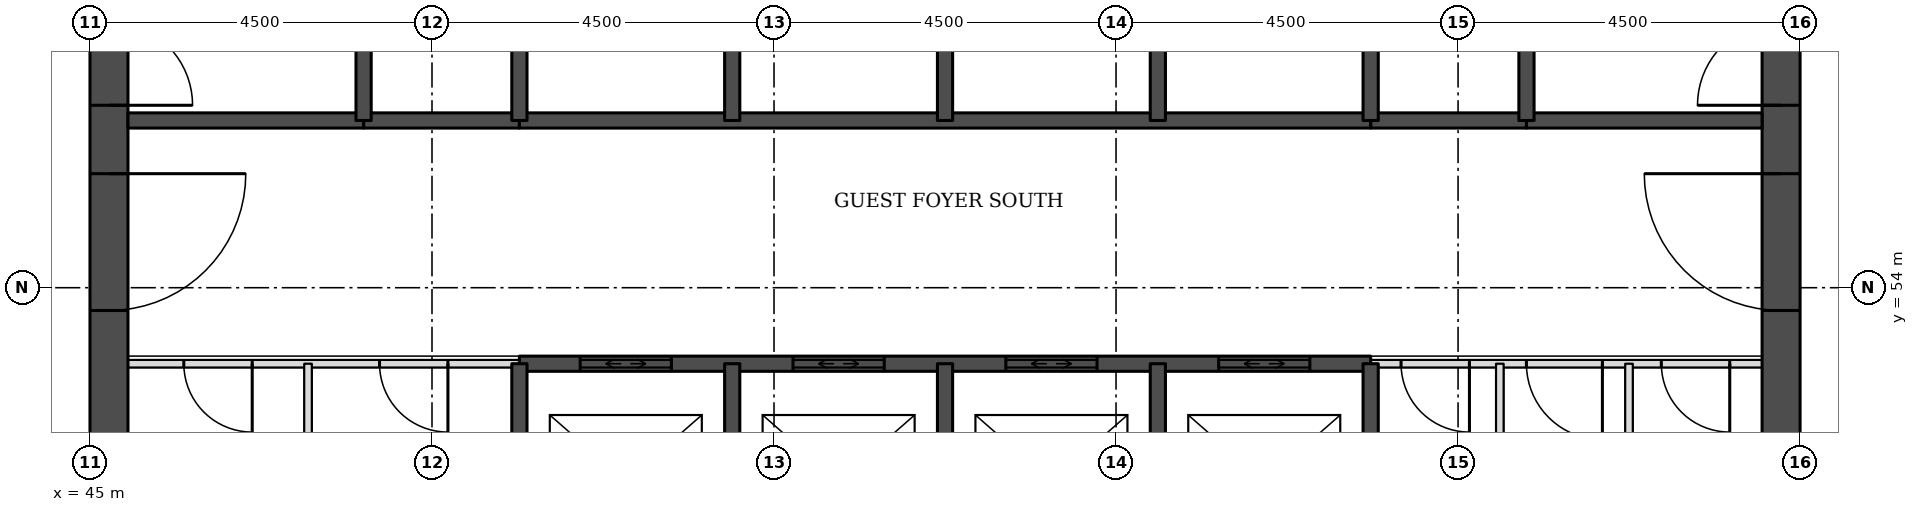
"""IFC4 building model, lengths in metres.
Left out: names, types, materials, properties, quantities, classifications, styles, units other than length and angle.
Written with IfcOpenShell. Run it as: python <this file> out.ifc"""

import sys

from ifc_helpers import new_model, si_unit, direction, frame, frame_2d, origin, place, context, subcontext, project, spatial, rectangle, extrude, element, fill, save


model = new_model("IFC4")
c1 = context("Model", 3, precision=1e-05, world=origin(), true_north=direction((0.0, 1.0)))
c2 = subcontext(c1, "Body", "Model", "MODEL_VIEW")
j1 = project(units=[si_unit("LENGTHUNIT", "METRE"), si_unit("PLANEANGLEUNIT", "RADIAN")], contexts=[c1])
p1 = place(None, origin())
s1 = spatial("IfcSite", under=j1, at=p1, CompositionType="ELEMENT")
p2 = place(p1, origin())
s2 = spatial("IfcBuilding", under=s1, at=p2, CompositionType="ELEMENT")
p3 = place(p2, frame((0.0, 0.0, 23.1)))
s3 = spatial("IfcBuildingStorey", under=s2, at=p3, CompositionType="ELEMENT", Elevation=23.1)
p4 = place(p3, frame((45.25, 49.5, 0.0), z_axis=(0.0, 0.0, 1.0), x_axis=(0.0, 1.0, 0.0)))
e1 = element("IfcWall", 1, at=p4, inside=s3, PredefinedType="SHEAR", context=c2, shape_type="SweptSolid", body=[
    extrude(rectangle(XDim=22.5, YDim=0.5, at=frame_2d((11.25, 0.0))), origin(), (0.0, 0.0, 1.0), 3.3),
])
p5 = place(p4, frame((4.2, 0.0, 0.0)))
e2 = element("IfcOpeningElement", 2, at=p5, cuts=e1, PredefinedType="OPENING", context=c2, shape_type="SweptSolid", body=[
    extrude(rectangle(XDim=1.8, YDim=2.1, at=frame_2d((0.9, 1.05))), frame((0.0, 0.26, 0.0), z_axis=(0.0, -1.0, 0.0), x_axis=(1.0, 0.0, 0.0)), (0.0, 0.0, 1.0), 0.52),
])
p6 = place(p4, frame((6.9, 0.0, 0.0)))
e3 = element("IfcOpeningElement", 3, at=p6, cuts=e1, PredefinedType="OPENING", context=c2, shape_type="SweptSolid", body=[
    extrude(rectangle(XDim=1.1, YDim=2.1, at=frame_2d((0.55, 1.05))), frame((0.0, 0.26, 0.0), z_axis=(0.0, -1.0, 0.0), x_axis=(1.0, 0.0, 0.0)), (0.0, 0.0, 1.0), 0.52),
])
p7 = place(p4, frame((13.6, 0.0, 0.0)))
e4 = element("IfcOpeningElement", 4, at=p7, cuts=e1, PredefinedType="OPENING", context=c2, shape_type="SweptSolid", body=[
    extrude(rectangle(XDim=1.1, YDim=2.1, at=frame_2d((0.55, 1.05))), frame((0.0, 0.26, 0.0), z_axis=(0.0, -1.0, 0.0), x_axis=(1.0, 0.0, 0.0)), (0.0, 0.0, 1.0), 0.52),
])
p8 = place(p4, frame((16.5, 0.0, 0.0)))
e5 = element("IfcOpeningElement", 5, at=p8, cuts=e1, PredefinedType="OPENING", context=c2, shape_type="SweptSolid", body=[
    extrude(rectangle(XDim=1.8, YDim=2.1, at=frame_2d((0.9, 1.05))), frame((0.0, 0.26, 0.0), z_axis=(0.0, -1.0, 0.0), x_axis=(1.0, 0.0, 0.0)), (0.0, 0.0, 1.0), 0.52),
])
p9 = place(p3, frame((67.25, 49.5, 0.0), z_axis=(0.0, 0.0, 1.0), x_axis=(0.0, 1.0, 0.0)))
e6 = element("IfcWall", 6, at=p9, inside=s3, PredefinedType="SHEAR", context=c2, shape_type="SweptSolid", body=[
    extrude(rectangle(XDim=22.5, YDim=0.5, at=frame_2d((11.25, 0.0))), origin(), (0.0, 0.0, 1.0), 3.3),
])
p10 = place(p9, frame((4.2, 0.0, 0.0)))
e7 = element("IfcOpeningElement", 7, at=p10, cuts=e6, PredefinedType="OPENING", context=c2, shape_type="SweptSolid", body=[
    extrude(rectangle(XDim=1.8, YDim=2.1, at=frame_2d((0.9, 1.05))), frame((0.0, 0.26, 0.0), z_axis=(0.0, -1.0, 0.0), x_axis=(1.0, 0.0, 0.0)), (0.0, 0.0, 1.0), 0.52),
])
p11 = place(p9, frame((6.9, 0.0, 0.0)))
e8 = element("IfcOpeningElement", 8, at=p11, cuts=e6, PredefinedType="OPENING", context=c2, shape_type="SweptSolid", body=[
    extrude(rectangle(XDim=1.1, YDim=2.1, at=frame_2d((0.55, 1.05))), frame((0.0, 0.26, 0.0), z_axis=(0.0, -1.0, 0.0), x_axis=(1.0, 0.0, 0.0)), (0.0, 0.0, 1.0), 0.52),
])
p12 = place(p9, frame((13.6, 0.0, 0.0)))
e9 = element("IfcOpeningElement", 9, at=p12, cuts=e6, PredefinedType="OPENING", context=c2, shape_type="SweptSolid", body=[
    extrude(rectangle(XDim=1.1, YDim=2.1, at=frame_2d((0.55, 1.05))), frame((0.0, 0.26, 0.0), z_axis=(0.0, -1.0, 0.0), x_axis=(1.0, 0.0, 0.0)), (0.0, 0.0, 1.0), 0.52),
])
p13 = place(p9, frame((16.5, 0.0, 0.0)))
e10 = element("IfcOpeningElement", 10, at=p13, cuts=e6, PredefinedType="OPENING", context=c2, shape_type="SweptSolid", body=[
    extrude(rectangle(XDim=1.8, YDim=2.1, at=frame_2d((0.9, 1.05))), frame((0.0, 0.26, 0.0), z_axis=(0.0, -1.0, 0.0), x_axis=(1.0, 0.0, 0.0)), (0.0, 0.0, 1.0), 0.52),
])
p14 = place(p3, frame((45.5, 53.0, 0.0), z_axis=(0.0, 0.0, 1.0), x_axis=(1.0, 0.0, 0.0)))
e11 = element("IfcWall", 11, at=p14, inside=s3, PredefinedType="PARTITIONING", context=c2, shape_type="SweptSolid", body=[
    extrude(rectangle(XDim=5.15, YDim=0.1, at=frame_2d((2.575, 0.0))), origin(), (0.0, 0.0, 1.0), 3.08),
])
p15 = place(p14, frame((0.735, 0.0, 0.0)))
e12 = element("IfcOpeningElement", 12, at=p15, cuts=e11, PredefinedType="OPENING", context=c2, shape_type="SweptSolid", body=[
    extrude(rectangle(XDim=0.9, YDim=2.1, at=frame_2d((0.45, 1.05))), frame((0.0, 0.06, 0.0), z_axis=(0.0, -1.0, 0.0), x_axis=(1.0, 0.0, 0.0)), (0.0, 0.0, 1.0), 0.12),
])
p16 = place(p14, frame((3.31, 0.0, 0.0)))
e13 = element("IfcOpeningElement", 13, at=p16, cuts=e11, PredefinedType="OPENING", context=c2, shape_type="SweptSolid", body=[
    extrude(rectangle(XDim=0.9, YDim=2.1, at=frame_2d((0.45, 1.05))), frame((0.0, 0.06, 0.0), z_axis=(0.0, -1.0, 0.0), x_axis=(1.0, 0.0, 0.0)), (0.0, 0.0, 1.0), 0.12),
])
p17 = place(p3, frame((61.85, 53.0, 0.0), z_axis=(0.0, 0.0, 1.0), x_axis=(1.0, 0.0, 0.0)))
e14 = element("IfcWall", 14, at=p17, inside=s3, PredefinedType="PARTITIONING", context=c2, shape_type="SweptSolid", body=[
    extrude(rectangle(XDim=5.15, YDim=0.1, at=frame_2d((2.575, 0.0))), origin(), (0.0, 0.0, 1.0), 3.08),
])
p18 = place(p17, frame((3.824, 0.0, 0.0)))
e15 = element("IfcOpeningElement", 15, at=p18, cuts=e14, PredefinedType="OPENING", context=c2, shape_type="SweptSolid", body=[
    extrude(rectangle(XDim=0.9, YDim=2.1, at=frame_2d((0.45, 1.05))), frame((0.0, 0.06, 0.0), z_axis=(0.0, -1.0, 0.0), x_axis=(1.0, 0.0, 0.0)), (0.0, 0.0, 1.0), 0.12),
])
p19 = place(p17, frame((2.049, 0.0, 0.0)))
e16 = element("IfcOpeningElement", 16, at=p19, cuts=e14, PredefinedType="OPENING", context=c2, shape_type="SweptSolid", body=[
    extrude(rectangle(XDim=1.0, YDim=2.1, at=frame_2d((0.5, 1.05))), frame((0.0, 0.06, 0.0), z_axis=(0.0, -1.0, 0.0), x_axis=(1.0, 0.0, 0.0)), (0.0, 0.0, 1.0), 0.12),
])
p20 = place(p17, frame((0.4, 0.0, 0.0)))
e17 = element("IfcOpeningElement", 17, at=p20, cuts=e14, PredefinedType="OPENING", context=c2, shape_type="SweptSolid", body=[
    extrude(rectangle(XDim=0.9, YDim=2.1, at=frame_2d((0.45, 1.05))), frame((0.0, 0.06, 0.0), z_axis=(0.0, -1.0, 0.0), x_axis=(1.0, 0.0, 0.0)), (0.0, 0.0, 1.0), 0.12),
])
p21 = place(p3, frame((50.65, 53.0, 0.0), z_axis=(0.0, 0.0, 1.0), x_axis=(1.0, 0.0, 0.0)))
e18 = element("IfcWall", 18, at=p21, inside=s3, PredefinedType="SOLIDWALL", context=c2, shape_type="SweptSolid", body=[
    extrude(rectangle(XDim=11.2, YDim=0.2, at=frame_2d((5.6, 0.0))), origin(), (0.0, 0.0, 1.0), 3.08),
])
p22 = place(p21, frame((0.8, 0.0, 0.0)))
e19 = element("IfcOpeningElement", 19, at=p22, cuts=e18, PredefinedType="OPENING", context=c2, shape_type="SweptSolid", body=[
    extrude(rectangle(XDim=1.2, YDim=2.1, at=frame_2d((0.6, 1.05))), frame((0.0, 0.11, 0.0), z_axis=(0.0, -1.0, 0.0), x_axis=(1.0, 0.0, 0.0)), (0.0, 0.0, 1.0), 0.22),
])
p23 = place(p21, frame((3.6, 0.0, 0.0)))
e20 = element("IfcOpeningElement", 20, at=p23, cuts=e18, PredefinedType="OPENING", context=c2, shape_type="SweptSolid", body=[
    extrude(rectangle(XDim=1.2, YDim=2.1, at=frame_2d((0.6, 1.05))), frame((0.0, 0.11, 0.0), z_axis=(0.0, -1.0, 0.0), x_axis=(1.0, 0.0, 0.0)), (0.0, 0.0, 1.0), 0.22),
])
p24 = place(p21, frame((6.4, 0.0, 0.0)))
e21 = element("IfcOpeningElement", 21, at=p24, cuts=e18, PredefinedType="OPENING", context=c2, shape_type="SweptSolid", body=[
    extrude(rectangle(XDim=1.2, YDim=2.1, at=frame_2d((0.6, 1.05))), frame((0.0, 0.11, 0.0), z_axis=(0.0, -1.0, 0.0), x_axis=(1.0, 0.0, 0.0)), (0.0, 0.0, 1.0), 0.22),
])
p25 = place(p21, frame((9.2, 0.0, 0.0)))
e22 = element("IfcOpeningElement", 22, at=p25, cuts=e18, PredefinedType="OPENING", context=c2, shape_type="SweptSolid", body=[
    extrude(rectangle(XDim=1.2, YDim=2.1, at=frame_2d((0.6, 1.05))), frame((0.0, 0.11, 0.0), z_axis=(0.0, -1.0, 0.0), x_axis=(1.0, 0.0, 0.0)), (0.0, 0.0, 1.0), 0.22),
])
for number, where, z_axis, x_axis in (
    (23, (48.6, 56.2, 0.0), (0.0, 0.0, 1.0), (1.0, 0.0, 0.0)),
    (24, (61.85, 56.2, 0.0), (0.0, 0.0, 1.0), (1.0, 0.0, 0.0)),
):
    element("IfcWall", number, at=place(p3, frame(where, z_axis=z_axis, x_axis=x_axis)), inside=s3, PredefinedType="SOLIDWALL", context=c2, shape_type="SweptSolid", body=[
        extrude(rectangle(XDim=2.05, YDim=0.2, at=frame_2d((1.025, 0.0))), origin(), (0.0, 0.0, 1.0), 3.08),
    ])
p26 = place(p3, frame((45.5, 56.2, 0.0), z_axis=(0.0, 0.0, 1.0), x_axis=(1.0, 0.0, 0.0)))
e25 = element("IfcWall", 25, at=p26, inside=s3, PredefinedType="SOLIDWALL", context=c2, shape_type="SweptSolid", body=[
    extrude(rectangle(XDim=3.1, YDim=0.2, at=frame_2d((1.55, 0.0))), origin(), (0.0, 0.0, 1.0), 3.08),
])
p27 = place(p3, frame((50.65, 56.2, 0.0), z_axis=(0.0, 0.0, 1.0), x_axis=(1.0, 0.0, 0.0)))
e26 = element("IfcWall", 26, at=p27, inside=s3, PredefinedType="SOLIDWALL", context=c2, shape_type="SweptSolid", body=[
    extrude(rectangle(XDim=11.2, YDim=0.2, at=frame_2d((5.6, 0.0))), origin(), (0.0, 0.0, 1.0), 3.08),
])
p28 = place(p3, frame((63.9, 56.2, 0.0), z_axis=(0.0, 0.0, 1.0), x_axis=(1.0, 0.0, 0.0)))
e27 = element("IfcWall", 27, at=p28, inside=s3, PredefinedType="SOLIDWALL", context=c2, shape_type="SweptSolid", body=[
    extrude(rectangle(XDim=3.1, YDim=0.2, at=frame_2d((1.55, 0.0))), origin(), (0.0, 0.0, 1.0), 3.08),
])
p29 = place(p3, frame((47.869, 50.0, 0.0), z_axis=(0.0, 0.0, 1.0), x_axis=(0.0, 1.0, 0.0)))
e28 = element("IfcWall", 28, at=p29, inside=s3, PredefinedType="PARTITIONING", context=c2, shape_type="SweptSolid", body=[
    extrude(rectangle(XDim=3.0, YDim=0.1, at=frame_2d((1.5, 0.0))), origin(), (0.0, 0.0, 1.0), 3.08),
])
p30 = place(p3, frame((48.6, 56.2, 0.0), z_axis=(0.0, 0.0, 1.0), x_axis=(0.0, 1.0, 0.0)))
e29 = element("IfcWall", 29, at=p30, inside=s3, PredefinedType="SOLIDWALL", context=c2, shape_type="SweptSolid", body=[
    extrude(rectangle(XDim=5.8, YDim=0.2, at=frame_2d((2.9, 0.0))), origin(), (0.0, 0.0, 1.0), 3.08),
])
p31 = place(p3, frame((50.65, 50.0, 0.0), z_axis=(0.0, 0.0, 1.0), x_axis=(0.0, 1.0, 0.0)))
e30 = element("IfcWall", 30, at=p31, inside=s3, PredefinedType="SOLIDWALL", context=c2, shape_type="SweptSolid", body=[
    extrude(rectangle(XDim=3.0, YDim=0.2, at=frame_2d((1.5, 0.0))), origin(), (0.0, 0.0, 1.0), 3.08),
])
p32 = place(p3, frame((50.65, 56.2, 0.0), z_axis=(0.0, 0.0, 1.0), x_axis=(0.0, 1.0, 0.0)))
e31 = element("IfcWall", 31, at=p32, inside=s3, PredefinedType="SOLIDWALL", context=c2, shape_type="SweptSolid", body=[
    extrude(rectangle(XDim=2.8, YDim=0.2, at=frame_2d((1.4, 0.0))), origin(), (0.0, 0.0, 1.0), 3.08),
])
p33 = place(p3, frame((53.45, 50.0, 0.0), z_axis=(0.0, 0.0, 1.0), x_axis=(0.0, 1.0, 0.0)))
e32 = element("IfcWall", 32, at=p33, inside=s3, PredefinedType="SOLIDWALL", context=c2, shape_type="SweptSolid", body=[
    extrude(rectangle(XDim=3.0, YDim=0.2, at=frame_2d((1.5, 0.0))), origin(), (0.0, 0.0, 1.0), 3.08),
])
p34 = place(p3, frame((53.45, 56.2, 0.0), z_axis=(0.0, 0.0, 1.0), x_axis=(0.0, 1.0, 0.0)))
e33 = element("IfcWall", 33, at=p34, inside=s3, PredefinedType="SOLIDWALL", context=c2, shape_type="SweptSolid", body=[
    extrude(rectangle(XDim=2.8, YDim=0.2, at=frame_2d((1.4, 0.0))), origin(), (0.0, 0.0, 1.0), 3.08),
])
p35 = place(p3, frame((56.25, 50.0, 0.0), z_axis=(0.0, 0.0, 1.0), x_axis=(0.0, 1.0, 0.0)))
e34 = element("IfcWall", 34, at=p35, inside=s3, PredefinedType="SOLIDWALL", context=c2, shape_type="SweptSolid", body=[
    extrude(rectangle(XDim=3.0, YDim=0.2, at=frame_2d((1.5, 0.0))), origin(), (0.0, 0.0, 1.0), 3.08),
])
p36 = place(p3, frame((56.25, 56.2, 0.0), z_axis=(0.0, 0.0, 1.0), x_axis=(0.0, 1.0, 0.0)))
e35 = element("IfcWall", 35, at=p36, inside=s3, PredefinedType="SOLIDWALL", context=c2, shape_type="SweptSolid", body=[
    extrude(rectangle(XDim=2.8, YDim=0.2, at=frame_2d((1.4, 0.0))), origin(), (0.0, 0.0, 1.0), 3.08),
])
p37 = place(p3, frame((59.05, 50.0, 0.0), z_axis=(0.0, 0.0, 1.0), x_axis=(0.0, 1.0, 0.0)))
e36 = element("IfcWall", 36, at=p37, inside=s3, PredefinedType="SOLIDWALL", context=c2, shape_type="SweptSolid", body=[
    extrude(rectangle(XDim=3.0, YDim=0.2, at=frame_2d((1.5, 0.0))), origin(), (0.0, 0.0, 1.0), 3.08),
])
p38 = place(p3, frame((59.05, 56.2, 0.0), z_axis=(0.0, 0.0, 1.0), x_axis=(0.0, 1.0, 0.0)))
e37 = element("IfcWall", 37, at=p38, inside=s3, PredefinedType="SOLIDWALL", context=c2, shape_type="SweptSolid", body=[
    extrude(rectangle(XDim=2.8, YDim=0.2, at=frame_2d((1.4, 0.0))), origin(), (0.0, 0.0, 1.0), 3.08),
])
p39 = place(p3, frame((61.85, 50.0, 0.0), z_axis=(0.0, 0.0, 1.0), x_axis=(0.0, 1.0, 0.0)))
e38 = element("IfcWall", 38, at=p39, inside=s3, PredefinedType="SOLIDWALL", context=c2, shape_type="SweptSolid", body=[
    extrude(rectangle(XDim=3.0, YDim=0.2, at=frame_2d((1.5, 0.0))), origin(), (0.0, 0.0, 1.0), 3.08),
])
p40 = place(p3, frame((61.85, 56.2, 0.0), z_axis=(0.0, 0.0, 1.0), x_axis=(0.0, 1.0, 0.0)))
e39 = element("IfcWall", 39, at=p40, inside=s3, PredefinedType="SOLIDWALL", context=c2, shape_type="SweptSolid", body=[
    extrude(rectangle(XDim=2.8, YDim=0.2, at=frame_2d((1.4, 0.0))), origin(), (0.0, 0.0, 1.0), 3.08),
])
p41 = place(p3, frame((63.55, 50.0, 0.0), z_axis=(0.0, 0.0, 1.0), x_axis=(0.0, 1.0, 0.0)))
e40 = element("IfcWall", 40, at=p41, inside=s3, PredefinedType="PARTITIONING", context=c2, shape_type="SweptSolid", body=[
    extrude(rectangle(XDim=3.0, YDim=0.1, at=frame_2d((1.5, 0.0))), origin(), (0.0, 0.0, 1.0), 3.08),
])
p42 = place(p3, frame((63.9, 56.2, 0.0), z_axis=(0.0, 0.0, 1.0), x_axis=(0.0, 1.0, 0.0)))
e41 = element("IfcWall", 41, at=p42, inside=s3, PredefinedType="SOLIDWALL", context=c2, shape_type="SweptSolid", body=[
    extrude(rectangle(XDim=5.8, YDim=0.2, at=frame_2d((2.9, 0.0))), origin(), (0.0, 0.0, 1.0), 3.08),
])
p43 = place(p3, frame((65.249, 50.0, 0.0), z_axis=(0.0, 0.0, 1.0), x_axis=(0.0, 1.0, 0.0)))
e42 = element("IfcWall", 42, at=p43, inside=s3, PredefinedType="PARTITIONING", context=c2, shape_type="SweptSolid", body=[
    extrude(rectangle(XDim=3.0, YDim=0.1, at=frame_2d((1.5, 0.0))), origin(), (0.0, 0.0, 1.0), 3.08),
])
p44 = place(p22, origin())
e43 = element("IfcDoor", 43, at=p44, inside=s3, OperationType="DOUBLE_DOOR_SLIDING", PredefinedType="DOOR", context=c2, shape_type="SweptSolid", body=[
    extrude(rectangle(XDim=1.2, YDim=2.1, at=frame_2d((0.6, 1.05))), frame((0.0, 0.025, 0.0), z_axis=(0.0, -1.0, 0.0), x_axis=(1.0, 0.0, 0.0)), (0.0, 0.0, 1.0), 0.05),
])
fill(e19, e43)
p45 = place(p23, origin())
e44 = element("IfcDoor", 44, at=p45, inside=s3, OperationType="DOUBLE_DOOR_SLIDING", PredefinedType="DOOR", context=c2, shape_type="SweptSolid", body=[
    extrude(rectangle(XDim=1.2, YDim=2.1, at=frame_2d((0.6, 1.05))), frame((0.0, 0.025, 0.0), z_axis=(0.0, -1.0, 0.0), x_axis=(1.0, 0.0, 0.0)), (0.0, 0.0, 1.0), 0.05),
])
fill(e20, e44)
p46 = place(p24, origin())
e45 = element("IfcDoor", 45, at=p46, inside=s3, OperationType="DOUBLE_DOOR_SLIDING", PredefinedType="DOOR", context=c2, shape_type="SweptSolid", body=[
    extrude(rectangle(XDim=1.2, YDim=2.1, at=frame_2d((0.6, 1.05))), frame((0.0, 0.025, 0.0), z_axis=(0.0, -1.0, 0.0), x_axis=(1.0, 0.0, 0.0)), (0.0, 0.0, 1.0), 0.05),
])
fill(e21, e45)
p47 = place(p25, origin())
e46 = element("IfcDoor", 46, at=p47, inside=s3, OperationType="DOUBLE_DOOR_SLIDING", PredefinedType="DOOR", context=c2, shape_type="SweptSolid", body=[
    extrude(rectangle(XDim=1.2, YDim=2.1, at=frame_2d((0.6, 1.05))), frame((0.0, 0.025, 0.0), z_axis=(0.0, -1.0, 0.0), x_axis=(1.0, 0.0, 0.0)), (0.0, 0.0, 1.0), 0.05),
])
fill(e22, e46)
p48 = place(p5, frame((1.8, 0.0, 0.0), z_axis=(0.0, 0.0, 1.0), x_axis=(-1.0, 0.0, 0.0)))
e47 = element("IfcDoor", 47, at=p48, inside=s3, OperationType="SINGLE_SWING_LEFT", PredefinedType="DOOR", context=c2, shape_type="SweptSolid", body=[
    extrude(rectangle(XDim=1.8, YDim=2.1, at=frame_2d((0.9, 1.05))), frame((0.0, 0.025, 0.0), z_axis=(0.0, -1.0, 0.0), x_axis=(1.0, 0.0, 0.0)), (0.0, 0.0, 1.0), 0.05),
])
fill(e2, e47)
p49 = place(p6, frame((1.1, 0.0, 0.0), z_axis=(0.0, 0.0, 1.0), x_axis=(-1.0, 0.0, 0.0)))
e48 = element("IfcDoor", 48, at=p49, inside=s3, OperationType="SINGLE_SWING_RIGHT", PredefinedType="DOOR", context=c2, shape_type="SweptSolid", body=[
    extrude(rectangle(XDim=1.1, YDim=2.1, at=frame_2d((0.55, 1.05))), frame((0.0, 0.025, 0.0), z_axis=(0.0, -1.0, 0.0), x_axis=(1.0, 0.0, 0.0)), (0.0, 0.0, 1.0), 0.05),
])
fill(e3, e48)
p50 = place(p10, origin())
e49 = element("IfcDoor", 49, at=p50, inside=s3, OperationType="SINGLE_SWING_RIGHT", PredefinedType="DOOR", context=c2, shape_type="SweptSolid", body=[
    extrude(rectangle(XDim=1.8, YDim=2.1, at=frame_2d((0.9, 1.05))), frame((0.0, 0.025, 0.0), z_axis=(0.0, -1.0, 0.0), x_axis=(1.0, 0.0, 0.0)), (0.0, 0.0, 1.0), 0.05),
])
fill(e7, e49)
p51 = place(p11, origin())
e50 = element("IfcDoor", 50, at=p51, inside=s3, OperationType="SINGLE_SWING_LEFT", PredefinedType="DOOR", context=c2, shape_type="SweptSolid", body=[
    extrude(rectangle(XDim=1.1, YDim=2.1, at=frame_2d((0.55, 1.05))), frame((0.0, 0.025, 0.0), z_axis=(0.0, -1.0, 0.0), x_axis=(1.0, 0.0, 0.0)), (0.0, 0.0, 1.0), 0.05),
])
fill(e8, e50)
p52 = place(p18, frame((0.9, 0.0, 0.0), z_axis=(0.0, 0.0, 1.0), x_axis=(-1.0, 0.0, 0.0)))
e51 = element("IfcDoor", 51, at=p52, inside=s3, OperationType="SINGLE_SWING_LEFT", PredefinedType="DOOR", context=c2, shape_type="SweptSolid", body=[
    extrude(rectangle(XDim=0.9, YDim=2.1, at=frame_2d((0.45, 1.05))), frame((0.0, 0.025, 0.0), z_axis=(0.0, -1.0, 0.0), x_axis=(1.0, 0.0, 0.0)), (0.0, 0.0, 1.0), 0.05),
])
fill(e15, e51)
p53 = place(p19, frame((1.0, 0.0, 0.0), z_axis=(0.0, 0.0, 1.0), x_axis=(-1.0, 0.0, 0.0)))
e52 = element("IfcDoor", 52, at=p53, inside=s3, OperationType="SINGLE_SWING_LEFT", PredefinedType="DOOR", context=c2, shape_type="SweptSolid", body=[
    extrude(rectangle(XDim=1.0, YDim=2.1, at=frame_2d((0.5, 1.05))), frame((0.0, 0.025, 0.0), z_axis=(0.0, -1.0, 0.0), x_axis=(1.0, 0.0, 0.0)), (0.0, 0.0, 1.0), 0.05),
])
fill(e16, e52)
p54 = place(p20, frame((0.9, 0.0, 0.0), z_axis=(0.0, 0.0, 1.0), x_axis=(-1.0, 0.0, 0.0)))
e53 = element("IfcDoor", 53, at=p54, inside=s3, OperationType="SINGLE_SWING_LEFT", PredefinedType="DOOR", context=c2, shape_type="SweptSolid", body=[
    extrude(rectangle(XDim=0.9, YDim=2.1, at=frame_2d((0.45, 1.05))), frame((0.0, 0.025, 0.0), z_axis=(0.0, -1.0, 0.0), x_axis=(1.0, 0.0, 0.0)), (0.0, 0.0, 1.0), 0.05),
])
fill(e17, e53)
p55 = place(p15, frame((0.9, 0.0, 0.0), z_axis=(0.0, 0.0, 1.0), x_axis=(-1.0, 0.0, 0.0)))
e54 = element("IfcDoor", 54, at=p55, inside=s3, OperationType="SINGLE_SWING_LEFT", PredefinedType="DOOR", context=c2, shape_type="SweptSolid", body=[
    extrude(rectangle(XDim=0.9, YDim=2.1, at=frame_2d((0.45, 1.05))), frame((0.0, 0.025, 0.0), z_axis=(0.0, -1.0, 0.0), x_axis=(1.0, 0.0, 0.0)), (0.0, 0.0, 1.0), 0.05),
])
fill(e12, e54)
p56 = place(p16, frame((0.9, 0.0, 0.0), z_axis=(0.0, 0.0, 1.0), x_axis=(-1.0, 0.0, 0.0)))
e55 = element("IfcDoor", 55, at=p56, inside=s3, OperationType="SINGLE_SWING_LEFT", PredefinedType="DOOR", context=c2, shape_type="SweptSolid", body=[
    extrude(rectangle(XDim=0.9, YDim=2.1, at=frame_2d((0.45, 1.05))), frame((0.0, 0.025, 0.0), z_axis=(0.0, -1.0, 0.0), x_axis=(1.0, 0.0, 0.0)), (0.0, 0.0, 1.0), 0.05),
])
fill(e13, e55)
save(model, sys.argv[1])
